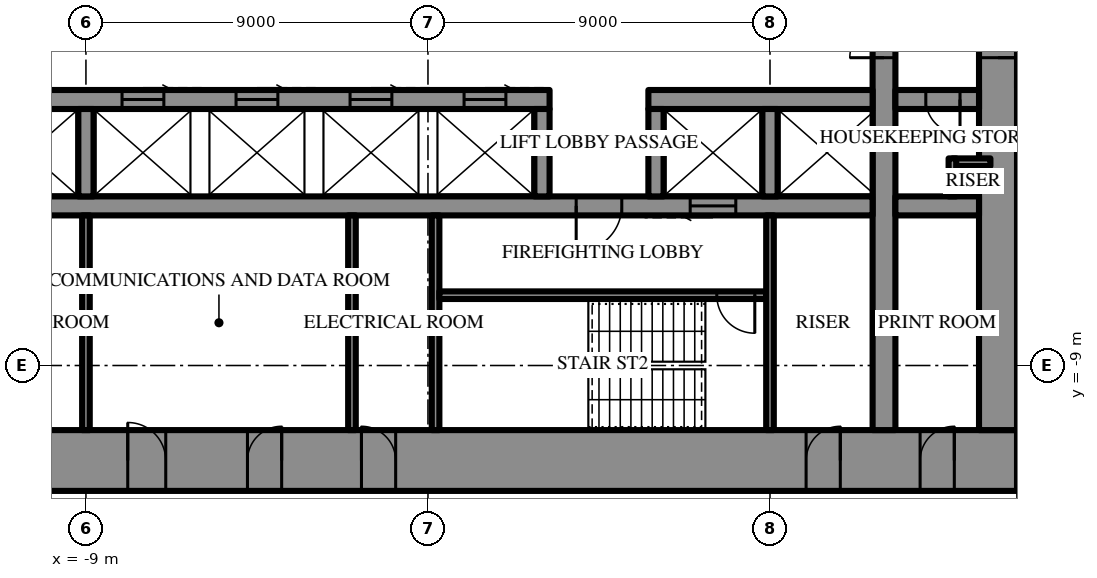
"""IFC4 building model, lengths in metres.
Left out: names, types, materials, properties, quantities, classifications, styles, units other than length and angle.
Written with IfcOpenShell. Run it as: python <this file> out.ifc"""

import sys

from ifc_helpers import new_model, si_unit, direction, frame, frame_2d, origin, place, context, subcontext, project, spatial, rectangle, extrude, element, fill, save


model = new_model("IFC4")
c1 = context("Model", 3, precision=1e-05, world=origin(), true_north=direction((0.0, 1.0)))
c2 = subcontext(c1, "Body", "Model", "MODEL_VIEW")
j1 = project(units=[si_unit("LENGTHUNIT", "METRE"), si_unit("PLANEANGLEUNIT", "RADIAN")], contexts=[c1])
p1 = place(None, origin())
s1 = spatial("IfcSite", under=j1, at=p1, CompositionType="ELEMENT")
p2 = place(p1, origin())
s2 = spatial("IfcBuilding", under=s1, at=p2, CompositionType="ELEMENT")
p3 = place(p2, frame((0.0, 0.0, 244.9)))
s3 = spatial("IfcBuildingStorey", under=s2, at=p3, CompositionType="ELEMENT", Elevation=244.9)
p4 = place(p3, frame((15.5, -11.5, 0.0), z_axis=(0.0, 0.0, 1.0), x_axis=(-1.0, 0.0, 0.0)))
e1 = element("IfcWall", 1, at=p4, inside=s3, PredefinedType="SHEAR", context=c2, shape_type="SweptSolid", body=[
    extrude(rectangle(XDim=31.0, YDim=1.6, at=frame_2d((15.5, 0.0))), origin(), (0.0, 0.0, 1.0), 4.2),
])
p5 = place(p4, frame((16.35, 0.0, 0.0)))
e2 = element("IfcOpeningElement", 2, at=p5, cuts=e1, PredefinedType="OPENING", context=c2, shape_type="SweptSolid", body=[
    extrude(rectangle(XDim=0.9, YDim=2.2, at=frame_2d((0.45, 1.1))), frame((0.0, 0.81, 0.0), z_axis=(0.0, -1.0, 0.0), x_axis=(1.0, 0.0, 0.0)), (0.0, 0.0, 1.0), 1.62),
])
p6 = place(p4, frame((19.35, 0.0, 0.0)))
e3 = element("IfcOpeningElement", 3, at=p6, cuts=e1, PredefinedType="OPENING", context=c2, shape_type="SweptSolid", body=[
    extrude(rectangle(XDim=0.9, YDim=2.2, at=frame_2d((0.45, 1.1))), frame((0.0, 0.81, 0.0), z_axis=(0.0, -1.0, 0.0), x_axis=(1.0, 0.0, 0.0)), (0.0, 0.0, 1.0), 1.62),
])
p7 = place(p4, frame((22.4, 0.0, 0.0)))
e4 = element("IfcOpeningElement", 4, at=p7, cuts=e1, PredefinedType="OPENING", context=c2, shape_type="SweptSolid", body=[
    extrude(rectangle(XDim=1.0, YDim=2.2, at=frame_2d((0.5, 1.1))), frame((0.0, 0.81, 0.0), z_axis=(0.0, -1.0, 0.0), x_axis=(1.0, 0.0, 0.0)), (0.0, 0.0, 1.0), 1.62),
])
p8 = place(p4, frame((1.65, 0.0, 0.0)))
e5 = element("IfcOpeningElement", 5, at=p8, cuts=e1, PredefinedType="OPENING", context=c2, shape_type="SweptSolid", body=[
    extrude(rectangle(XDim=0.9, YDim=2.2, at=frame_2d((0.45, 1.1))), frame((0.0, 0.81, 0.0), z_axis=(0.0, -1.0, 0.0), x_axis=(1.0, 0.0, 0.0)), (0.0, 0.0, 1.0), 1.62),
])
p9 = place(p4, frame((4.65, 0.0, 0.0)))
e6 = element("IfcOpeningElement", 6, at=p9, cuts=e1, PredefinedType="OPENING", context=c2, shape_type="SweptSolid", body=[
    extrude(rectangle(XDim=0.9, YDim=2.2, at=frame_2d((0.45, 1.1))), frame((0.0, 0.81, 0.0), z_axis=(0.0, -1.0, 0.0), x_axis=(1.0, 0.0, 0.0)), (0.0, 0.0, 1.0), 1.62),
])
p10 = place(p4, frame((25.45, 0.0, 0.0)))
e7 = element("IfcOpeningElement", 7, at=p10, cuts=e1, PredefinedType="OPENING", context=c2, shape_type="SweptSolid", body=[
    extrude(rectangle(XDim=0.9, YDim=2.2, at=frame_2d((0.45, 1.1))), frame((0.0, 0.81, 0.0), z_axis=(0.0, -1.0, 0.0), x_axis=(1.0, 0.0, 0.0)), (0.0, 0.0, 1.0), 1.62),
])
p11 = place(p4, frame((28.45, 0.0, 0.0)))
e8 = element("IfcOpeningElement", 8, at=p11, cuts=e1, PredefinedType="OPENING", context=c2, shape_type="SweptSolid", body=[
    extrude(rectangle(XDim=0.9, YDim=2.2, at=frame_2d((0.45, 1.1))), frame((0.0, 0.81, 0.0), z_axis=(0.0, -1.0, 0.0), x_axis=(1.0, 0.0, 0.0)), (0.0, 0.0, 1.0), 1.62),
])
p12 = place(p3, frame((15.0, -10.7, 0.0), z_axis=(0.0, 0.0, 1.0), x_axis=(0.0, 1.0, 0.0)))
e9 = element("IfcWall", 9, at=p12, inside=s3, PredefinedType="SHEAR", context=c2, shape_type="SweptSolid", body=[
    extrude(rectangle(XDim=21.4, YDim=1.0, at=frame_2d((10.7, 0.0))), origin(), (0.0, 0.0, 1.0), 4.2),
])
p13 = place(p12, frame((9.8, 0.0, 0.0)))
e10 = element("IfcOpeningElement", 10, at=p13, cuts=e9, PredefinedType="OPENING", context=c2, shape_type="SweptSolid", body=[
    extrude(rectangle(XDim=1.8, YDim=2.4, at=frame_2d((0.9, 1.2))), frame((0.0, 0.51, 0.0), z_axis=(0.0, -1.0, 0.0), x_axis=(1.0, 0.0, 0.0)), (0.0, 0.0, 1.0), 1.02),
])
p14 = place(p3, frame((12.0, -10.7, 0.0), z_axis=(0.0, 0.0, 1.0), x_axis=(0.0, 1.0, 0.0)))
e11 = element("IfcWall", 11, at=p14, inside=s3, PredefinedType="SHEAR", context=c2, shape_type="SweptSolid", body=[
    extrude(rectangle(XDim=21.4, YDim=0.6, at=frame_2d((10.7, 0.0))), origin(), (0.0, 0.0, 1.0), 4.2),
])
p15 = place(p14, frame((9.8, 0.0, 0.0)))
e12 = element("IfcOpeningElement", 12, at=p15, cuts=e11, PredefinedType="OPENING", context=c2, shape_type="SweptSolid", body=[
    extrude(rectangle(XDim=1.8, YDim=2.4, at=frame_2d((0.9, 1.2))), frame((0.0, 0.31, 0.0), z_axis=(0.0, -1.0, 0.0), x_axis=(1.0, 0.0, 0.0)), (0.0, 0.0, 1.0), 0.62),
])
p16 = place(p3, frame((14.5, -2.0, 0.0), z_axis=(0.0, 0.0, 1.0), x_axis=(-1.0, 0.0, 0.0)))
e13 = element("IfcWall", 13, at=p16, inside=s3, PredefinedType="SHEAR", context=c2, shape_type="SweptSolid", body=[
    extrude(rectangle(XDim=2.2, YDim=0.5, at=frame_2d((1.1, 0.0))), origin(), (0.0, 0.0, 1.0), 4.2),
])
p17 = place(p16, frame((0.5, 0.0, 0.0)))
e14 = element("IfcOpeningElement", 14, at=p17, cuts=e13, PredefinedType="OPENING", context=c2, shape_type="SweptSolid", body=[
    extrude(rectangle(XDim=0.9, YDim=2.2, at=frame_2d((0.45, 1.1))), frame((0.0, 0.26, 0.0), z_axis=(0.0, -1.0, 0.0), x_axis=(1.0, 0.0, 0.0)), (0.0, 0.0, 1.0), 0.52),
])
p18 = place(p3, frame((11.7, -2.0, 0.0), z_axis=(0.0, 0.0, 1.0), x_axis=(-1.0, 0.0, 0.0)))
e15 = element("IfcWall", 15, at=p18, inside=s3, PredefinedType="SHEAR", context=c2, shape_type="SweptSolid", body=[
    extrude(rectangle(XDim=5.9, YDim=0.5, at=frame_2d((2.95, 0.0))), origin(), (0.0, 0.0, 1.0), 4.2),
])
p19 = place(p3, frame((3.2, -2.0, 0.0), z_axis=(0.0, 0.0, 1.0), x_axis=(-1.0, 0.0, 0.0)))
e16 = element("IfcWall", 16, at=p19, inside=s3, PredefinedType="SHEAR", context=c2, shape_type="SweptSolid", body=[
    extrude(rectangle(XDim=14.9, YDim=0.5, at=frame_2d((7.45, 0.0))), origin(), (0.0, 0.0, 1.0), 4.2),
])
p20 = place(p19, frame((1.15, 0.0, 0.0)))
e17 = element("IfcOpeningElement", 17, at=p20, cuts=e16, PredefinedType="OPENING", context=c2, shape_type="SweptSolid", body=[
    extrude(rectangle(XDim=1.1, YDim=2.2, at=frame_2d((0.55, 1.1))), frame((0.0, 0.26, 0.0), z_axis=(0.0, -1.0, 0.0), x_axis=(1.0, 0.0, 0.0)), (0.0, 0.0, 1.0), 0.52),
])
p21 = place(p19, frame((4.15, 0.0, 0.0)))
e18 = element("IfcOpeningElement", 18, at=p21, cuts=e16, PredefinedType="OPENING", context=c2, shape_type="SweptSolid", body=[
    extrude(rectangle(XDim=1.1, YDim=2.2, at=frame_2d((0.55, 1.1))), frame((0.0, 0.26, 0.0), z_axis=(0.0, -1.0, 0.0), x_axis=(1.0, 0.0, 0.0)), (0.0, 0.0, 1.0), 0.52),
])
p22 = place(p19, frame((7.15, 0.0, 0.0)))
e19 = element("IfcOpeningElement", 19, at=p22, cuts=e16, PredefinedType="OPENING", context=c2, shape_type="SweptSolid", body=[
    extrude(rectangle(XDim=1.1, YDim=2.2, at=frame_2d((0.55, 1.1))), frame((0.0, 0.26, 0.0), z_axis=(0.0, -1.0, 0.0), x_axis=(1.0, 0.0, 0.0)), (0.0, 0.0, 1.0), 0.52),
])
p23 = place(p19, frame((10.15, 0.0, 0.0)))
e20 = element("IfcOpeningElement", 20, at=p23, cuts=e16, PredefinedType="OPENING", context=c2, shape_type="SweptSolid", body=[
    extrude(rectangle(XDim=1.1, YDim=2.2, at=frame_2d((0.55, 1.1))), frame((0.0, 0.26, 0.0), z_axis=(0.0, -1.0, 0.0), x_axis=(1.0, 0.0, 0.0)), (0.0, 0.0, 1.0), 0.52),
])
p24 = place(p3, frame((14.5, -4.8, 0.0), z_axis=(0.0, 0.0, 1.0), x_axis=(-1.0, 0.0, 0.0)))
e21 = element("IfcWall", 21, at=p24, inside=s3, PredefinedType="SHEAR", context=c2, shape_type="SweptSolid", body=[
    extrude(rectangle(XDim=2.2, YDim=0.5, at=frame_2d((1.1, 0.0))), origin(), (0.0, 0.0, 1.0), 4.2),
])
p25 = place(p3, frame((11.7, -4.8, 0.0), z_axis=(0.0, 0.0, 1.0), x_axis=(-1.0, 0.0, 0.0)))
e22 = element("IfcWall", 22, at=p25, inside=s3, PredefinedType="SHEAR", context=c2, shape_type="SweptSolid", body=[
    extrude(rectangle(XDim=23.4, YDim=0.5, at=frame_2d((11.7, 0.0))), origin(), (0.0, 0.0, 1.0), 4.2),
])
p26 = place(p25, frame((6.6, 0.0, 0.0)))
e23 = element("IfcOpeningElement", 23, at=p26, cuts=e22, PredefinedType="OPENING", context=c2, shape_type="SweptSolid", body=[
    extrude(rectangle(XDim=1.2, YDim=2.2, at=frame_2d((0.6, 1.1))), frame((0.0, 0.26, 0.0), z_axis=(0.0, -1.0, 0.0), x_axis=(1.0, 0.0, 0.0)), (0.0, 0.0, 1.0), 0.52),
])
p27 = place(p25, frame((3.6, 0.0, 0.0)))
e24 = element("IfcOpeningElement", 24, at=p27, cuts=e22, PredefinedType="OPENING", context=c2, shape_type="SweptSolid", body=[
    extrude(rectangle(XDim=1.2, YDim=2.2, at=frame_2d((0.6, 1.1))), frame((0.0, 0.26, 0.0), z_axis=(0.0, -1.0, 0.0), x_axis=(1.0, 0.0, 0.0)), (0.0, 0.0, 1.0), 0.52),
])
for number, where, z_axis, x_axis in (
    (25, (9.0, -2.25, 0.0), (0.0, 0.0, 1.0), (0.0, -1.0, 0.0)),
    (26, (6.0, -2.25, 0.0), (0.0, 0.0, 1.0), (0.0, -1.0, 0.0)),
    (27, (3.0, -2.25, 0.0), (0.0, 0.0, 1.0), (0.0, -1.0, 0.0)),
    (28, (-9.0, -2.25, 0.0), (0.0, 0.0, 1.0), (0.0, -1.0, 0.0)),
):
    element("IfcWall", number, at=place(p3, frame(where, z_axis=z_axis, x_axis=x_axis)), inside=s3, PredefinedType="SHEAR", context=c2, shape_type="SweptSolid", body=[
        extrude(rectangle(XDim=2.3, YDim=0.4, at=frame_2d((1.15, 0.0))), origin(), (0.0, 0.0, 1.0), 4.2),
    ])
p28 = place(p3, frame((0.2, -5.05, 0.0), z_axis=(0.0, 0.0, 1.0), x_axis=(0.0, -1.0, 0.0)))
e29 = element("IfcWall", 29, at=p28, inside=s3, PredefinedType="SHEAR", context=c2, shape_type="SweptSolid", body=[
    extrude(rectangle(XDim=5.65, YDim=0.2, at=frame_2d((2.825, 0.0))), origin(), (0.0, 0.0, 1.0), 4.2),
])
p29 = place(p3, frame((8.9, -7.15, 0.0), z_axis=(0.0, 0.0, 1.0), x_axis=(-1.0, 0.0, 0.0)))
e30 = element("IfcWall", 30, at=p29, inside=s3, PredefinedType="SHEAR", context=c2, shape_type="SweptSolid", body=[
    extrude(rectangle(XDim=8.6, YDim=0.2, at=frame_2d((4.3, 0.0))), origin(), (0.0, 0.0, 1.0), 4.2),
])
p30 = place(p29, frame((0.3, 0.0, 0.0)))
e31 = element("IfcOpeningElement", 31, at=p30, cuts=e30, PredefinedType="OPENING", context=c2, shape_type="SweptSolid", body=[
    extrude(rectangle(XDim=1.0, YDim=2.2, at=frame_2d((0.5, 1.1))), frame((0.0, 0.11, 0.0), z_axis=(0.0, -1.0, 0.0), x_axis=(1.0, 0.0, 0.0)), (0.0, 0.0, 1.0), 0.22),
])
for number, where, z_axis, x_axis in (
    (32, (9.0, -5.05, 0.0), (0.0, 0.0, 1.0), (0.0, -1.0, 0.0)),
    (33, (-9.0, -5.05, 0.0), (0.0, 0.0, 1.0), (0.0, -1.0, 0.0)),
    (34, (-2.0, -5.05, 0.0), (0.0, 0.0, 1.0), (0.0, -1.0, 0.0)),
):
    element("IfcWall", number, at=place(p3, frame(where, z_axis=z_axis, x_axis=x_axis)), inside=s3, PredefinedType="PARTITIONING", context=c2, shape_type="SweptSolid", body=[
        extrude(rectangle(XDim=5.65, YDim=0.2, at=frame_2d((2.825, 0.0))), origin(), (0.0, 0.0, 1.0), 4.0),
    ])
for number, where, z_axis, x_axis in (
    (35, (14.8, -3.65, 0.0), (0.0, 0.0, 1.0), (-1.0, 0.0, 0.0)),
    (36, (13.8, -3.55, 0.0), (0.0, 0.0, 1.0), (0.0, -1.0, 0.0)),
):
    element("IfcWall", number, at=place(p3, frame(where, z_axis=z_axis, x_axis=x_axis)), inside=s3, PredefinedType="PARTITIONING", context=c2, shape_type="SweptSolid", body=[
        extrude(rectangle(XDim=1.0, YDim=0.2, at=frame_2d((0.5, 0.0))), origin(), (0.0, 0.0, 1.0), 4.0),
    ])
p31 = place(p13, frame((1.8, 0.0, 0.0), z_axis=(0.0, 0.0, 1.0), x_axis=(-1.0, 0.0, 0.0)))
e37 = element("IfcDoor", 37, at=p31, inside=s3, OperationType="DOUBLE_DOOR_SINGLE_SWING", PredefinedType="DOOR", context=c2, shape_type="SweptSolid", body=[
    extrude(rectangle(XDim=1.8, YDim=2.4, at=frame_2d((0.9, 1.2))), frame((0.0, 0.025, 0.0), z_axis=(0.0, -1.0, 0.0), x_axis=(1.0, 0.0, 0.0)), (0.0, 0.0, 1.0), 0.05),
])
fill(e10, e37)
p32 = place(p26, origin())
e38 = element("IfcDoor", 38, at=p32, inside=s3, OperationType="SINGLE_SWING_LEFT", PredefinedType="DOOR", context=c2, shape_type="SweptSolid", body=[
    extrude(rectangle(XDim=1.2, YDim=2.2, at=frame_2d((0.6, 1.1))), frame((0.0, 0.025, 0.0), z_axis=(0.0, -1.0, 0.0), x_axis=(1.0, 0.0, 0.0)), (0.0, 0.0, 1.0), 0.05),
])
fill(e23, e38)
p33 = place(p30, origin())
e39 = element("IfcDoor", 39, at=p33, inside=s3, OperationType="SINGLE_SWING_RIGHT", PredefinedType="DOOR", context=c2, shape_type="SweptSolid", body=[
    extrude(rectangle(XDim=1.0, YDim=2.2, at=frame_2d((0.5, 1.1))), frame((0.0, 0.025, 0.0), z_axis=(0.0, -1.0, 0.0), x_axis=(1.0, 0.0, 0.0)), (0.0, 0.0, 1.0), 0.05),
])
fill(e31, e39)
p34 = place(p5, frame((0.9, 0.0, 0.0), z_axis=(0.0, 0.0, 1.0), x_axis=(-1.0, 0.0, 0.0)))
e40 = element("IfcDoor", 40, at=p34, inside=s3, OperationType="SINGLE_SWING_RIGHT", PredefinedType="DOOR", context=c2, shape_type="SweptSolid", body=[
    extrude(rectangle(XDim=0.9, YDim=2.2, at=frame_2d((0.45, 1.1))), frame((0.0, 0.025, 0.0), z_axis=(0.0, -1.0, 0.0), x_axis=(1.0, 0.0, 0.0)), (0.0, 0.0, 1.0), 0.05),
])
fill(e2, e40)
p35 = place(p6, frame((0.9, 0.0, 0.0), z_axis=(0.0, 0.0, 1.0), x_axis=(-1.0, 0.0, 0.0)))
e41 = element("IfcDoor", 41, at=p35, inside=s3, OperationType="SINGLE_SWING_LEFT", PredefinedType="DOOR", context=c2, shape_type="SweptSolid", body=[
    extrude(rectangle(XDim=0.9, YDim=2.2, at=frame_2d((0.45, 1.1))), frame((0.0, 0.025, 0.0), z_axis=(0.0, -1.0, 0.0), x_axis=(1.0, 0.0, 0.0)), (0.0, 0.0, 1.0), 0.05),
])
fill(e3, e41)
p36 = place(p7, frame((1.0, 0.0, 0.0), z_axis=(0.0, 0.0, 1.0), x_axis=(-1.0, 0.0, 0.0)))
e42 = element("IfcDoor", 42, at=p36, inside=s3, OperationType="SINGLE_SWING_RIGHT", PredefinedType="DOOR", context=c2, shape_type="SweptSolid", body=[
    extrude(rectangle(XDim=1.0, YDim=2.2, at=frame_2d((0.5, 1.1))), frame((0.0, 0.025, 0.0), z_axis=(0.0, -1.0, 0.0), x_axis=(1.0, 0.0, 0.0)), (0.0, 0.0, 1.0), 0.05),
])
fill(e4, e42)
p37 = place(p8, frame((0.9, 0.0, 0.0), z_axis=(0.0, 0.0, 1.0), x_axis=(-1.0, 0.0, 0.0)))
e43 = element("IfcDoor", 43, at=p37, inside=s3, OperationType="SINGLE_SWING_LEFT", PredefinedType="DOOR", context=c2, shape_type="SweptSolid", body=[
    extrude(rectangle(XDim=0.9, YDim=2.2, at=frame_2d((0.45, 1.1))), frame((0.0, 0.025, 0.0), z_axis=(0.0, -1.0, 0.0), x_axis=(1.0, 0.0, 0.0)), (0.0, 0.0, 1.0), 0.05),
])
fill(e5, e43)
p38 = place(p9, frame((0.9, 0.0, 0.0), z_axis=(0.0, 0.0, 1.0), x_axis=(-1.0, 0.0, 0.0)))
e44 = element("IfcDoor", 44, at=p38, inside=s3, OperationType="SINGLE_SWING_LEFT", PredefinedType="DOOR", context=c2, shape_type="SweptSolid", body=[
    extrude(rectangle(XDim=0.9, YDim=2.2, at=frame_2d((0.45, 1.1))), frame((0.0, 0.025, 0.0), z_axis=(0.0, -1.0, 0.0), x_axis=(1.0, 0.0, 0.0)), (0.0, 0.0, 1.0), 0.05),
])
fill(e6, e44)
p39 = place(p17, origin())
e45 = element("IfcDoor", 45, at=p39, inside=s3, OperationType="SINGLE_SWING_RIGHT", PredefinedType="DOOR", context=c2, shape_type="SweptSolid", body=[
    extrude(rectangle(XDim=0.9, YDim=2.2, at=frame_2d((0.45, 1.1))), frame((0.0, 0.025, 0.0), z_axis=(0.0, -1.0, 0.0), x_axis=(1.0, 0.0, 0.0)), (0.0, 0.0, 1.0), 0.05),
])
fill(e14, e45)
p40 = place(p15, origin())
e46 = element("IfcDoor", 46, at=p40, inside=s3, OperationType="DOUBLE_DOOR_SINGLE_SWING", PredefinedType="DOOR", context=c2, shape_type="SweptSolid", body=[
    extrude(rectangle(XDim=1.8, YDim=2.4, at=frame_2d((0.9, 1.2))), frame((0.0, 0.025, 0.0), z_axis=(0.0, -1.0, 0.0), x_axis=(1.0, 0.0, 0.0)), (0.0, 0.0, 1.0), 0.05),
])
fill(e12, e46)
p41 = place(p27, origin())
e47 = element("IfcDoor", 47, at=p41, inside=s3, OperationType="SLIDING_TO_LEFT", PredefinedType="DOOR", context=c2, shape_type="SweptSolid", body=[
    extrude(rectangle(XDim=1.2, YDim=2.2, at=frame_2d((0.6, 1.1))), frame((0.0, 0.025, 0.0), z_axis=(0.0, -1.0, 0.0), x_axis=(1.0, 0.0, 0.0)), (0.0, 0.0, 1.0), 0.05),
])
fill(e24, e47)
p42 = place(p20, frame((1.1, 0.0, 0.0), z_axis=(0.0, 0.0, 1.0), x_axis=(-1.0, 0.0, 0.0)))
e48 = element("IfcDoor", 48, at=p42, inside=s3, OperationType="SLIDING_TO_LEFT", PredefinedType="DOOR", context=c2, shape_type="SweptSolid", body=[
    extrude(rectangle(XDim=1.1, YDim=2.2, at=frame_2d((0.55, 1.1))), frame((0.0, 0.025, 0.0), z_axis=(0.0, -1.0, 0.0), x_axis=(1.0, 0.0, 0.0)), (0.0, 0.0, 1.0), 0.05),
])
fill(e17, e48)
p43 = place(p21, frame((1.1, 0.0, 0.0), z_axis=(0.0, 0.0, 1.0), x_axis=(-1.0, 0.0, 0.0)))
e49 = element("IfcDoor", 49, at=p43, inside=s3, OperationType="SLIDING_TO_LEFT", PredefinedType="DOOR", context=c2, shape_type="SweptSolid", body=[
    extrude(rectangle(XDim=1.1, YDim=2.2, at=frame_2d((0.55, 1.1))), frame((0.0, 0.025, 0.0), z_axis=(0.0, -1.0, 0.0), x_axis=(1.0, 0.0, 0.0)), (0.0, 0.0, 1.0), 0.05),
])
fill(e18, e49)
p44 = place(p22, frame((1.1, 0.0, 0.0), z_axis=(0.0, 0.0, 1.0), x_axis=(-1.0, 0.0, 0.0)))
e50 = element("IfcDoor", 50, at=p44, inside=s3, OperationType="SLIDING_TO_LEFT", PredefinedType="DOOR", context=c2, shape_type="SweptSolid", body=[
    extrude(rectangle(XDim=1.1, YDim=2.2, at=frame_2d((0.55, 1.1))), frame((0.0, 0.025, 0.0), z_axis=(0.0, -1.0, 0.0), x_axis=(1.0, 0.0, 0.0)), (0.0, 0.0, 1.0), 0.05),
])
fill(e19, e50)
p45 = place(p23, frame((1.1, 0.0, 0.0), z_axis=(0.0, 0.0, 1.0), x_axis=(-1.0, 0.0, 0.0)))
e51 = element("IfcDoor", 51, at=p45, inside=s3, OperationType="SLIDING_TO_LEFT", PredefinedType="DOOR", context=c2, shape_type="SweptSolid", body=[
    extrude(rectangle(XDim=1.1, YDim=2.2, at=frame_2d((0.55, 1.1))), frame((0.0, 0.025, 0.0), z_axis=(0.0, -1.0, 0.0), x_axis=(1.0, 0.0, 0.0)), (0.0, 0.0, 1.0), 0.05),
])
fill(e20, e51)
save(model, sys.argv[1])
